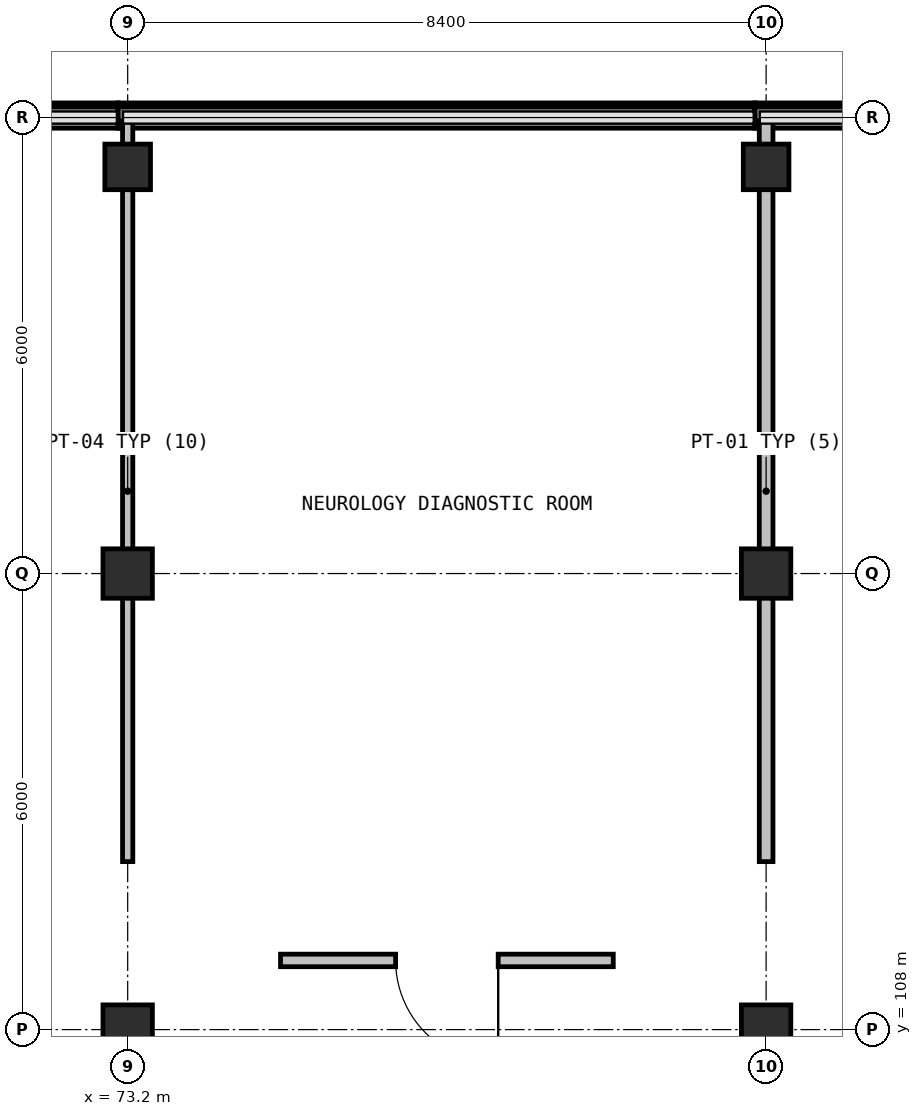
"""IFC4 building model, lengths in metres.
Left out: names, types, materials, properties, quantities, classifications, styles, units other than length and angle.
Written with IfcOpenShell. Run it as: python <this file> out.ifc"""

import sys

from ifc_helpers import new_model, si_unit, direction, frame, frame_2d, origin, origin_2d, place, context, subcontext, project, spatial, rectangle, extrude, element, fill, save


model = new_model("IFC4")
c1 = context("Model", 3, precision=1e-05, world=origin(), true_north=direction((0.0, 1.0)))
c2 = subcontext(c1, "Body", "Model", "MODEL_VIEW")
j1 = project(units=[si_unit("LENGTHUNIT", "METRE"), si_unit("PLANEANGLEUNIT", "RADIAN")], contexts=[c1])
p1 = place(None, origin())
s1 = spatial("IfcSite", under=j1, at=p1, CompositionType="ELEMENT")
p2 = place(p1, origin())
s2 = spatial("IfcBuilding", under=s1, at=p2, CompositionType="ELEMENT")
p3 = place(p2, frame((0.0, 0.0, 27.3)))
s3 = spatial("IfcBuildingStorey", under=s2, at=p3, CompositionType="ELEMENT", Elevation=27.3)
for number, where, z_axis, x_axis in (
    (1, (73.2, 108.0, 0.0), (0.0, 0.0, 1.0), (1.0, 0.0, 0.0)),
    (2, (73.2, 114.0, 0.0), (0.0, 0.0, 1.0), (1.0, 0.0, 0.0)),
):
    element("IfcColumn", number, at=place(p3, frame(where, z_axis=z_axis, x_axis=x_axis)), inside=s3, PredefinedType="COLUMN", context=c2, shape_type="SweptSolid", body=[
        extrude(rectangle(XDim=0.65, YDim=0.65, at=origin_2d()), origin(), (0.0, 0.0, 1.0), 4.05),
    ])
p4 = place(p3, frame((73.2, 119.35, 0.0), z_axis=(0.0, 0.0, 1.0), x_axis=(1.0, 0.0, 0.0)))
e3 = element("IfcColumn", 3, at=p4, inside=s3, PredefinedType="COLUMN", context=c2, shape_type="SweptSolid", body=[
    extrude(rectangle(XDim=0.6, YDim=0.6, at=origin_2d()), origin(), (0.0, 0.0, 1.0), 4.05),
])
for number, where, z_axis, x_axis in (
    (4, (81.6, 108.0, 0.0), (0.0, 0.0, 1.0), (1.0, 0.0, 0.0)),
    (5, (81.6, 114.0, 0.0), (0.0, 0.0, 1.0), (1.0, 0.0, 0.0)),
):
    element("IfcColumn", number, at=place(p3, frame(where, z_axis=z_axis, x_axis=x_axis)), inside=s3, PredefinedType="COLUMN", context=c2, shape_type="SweptSolid", body=[
        extrude(rectangle(XDim=0.65, YDim=0.65, at=origin_2d()), origin(), (0.0, 0.0, 1.0), 4.05),
    ])
p5 = place(p3, frame((81.6, 119.35, 0.0), z_axis=(0.0, 0.0, 1.0), x_axis=(1.0, 0.0, 0.0)))
e6 = element("IfcColumn", 6, at=p5, inside=s3, PredefinedType="COLUMN", context=c2, shape_type="SweptSolid", body=[
    extrude(rectangle(XDim=0.6, YDim=0.6, at=origin_2d()), origin(), (0.0, 0.0, 1.0), 4.05),
])
for number, where, z_axis, x_axis in (
    (7, (64.696, 119.999, 0.0), (0.0, 0.0, 1.0), (1.0, 0.0, 0.0)),
    (8, (73.075, 119.999, 0.0), (0.0, 0.0, 1.0), (1.0, 0.0, 0.0)),
    (9, (81.454, 119.999, 0.0), (0.0, 0.0, 1.0), (1.0, 0.0, 0.0)),
):
    element("IfcWall", number, at=place(p3, frame(where, z_axis=z_axis, x_axis=x_axis)), inside=s3, PredefinedType="SOLIDWALL", context=c2, shape_type="SweptSolid", body=[
        extrude(rectangle(XDim=8.375, YDim=0.28, at=frame_2d((4.188, 0.0))), origin(), (0.0, 0.0, 1.0), 0.94),
    ])
p6 = place(p3, frame((73.2, 119.957, 0.0), z_axis=(0.0, 0.0, 1.0), x_axis=(0.0, -1.0, 0.0)))
e10 = element("IfcWall", 10, at=p6, inside=s3, PredefinedType="PARTITIONING", context=c2, shape_type="SweptSolid", body=[
    extrude(rectangle(XDim=9.747, YDim=0.135, at=frame_2d((4.874, 0.0))), origin(), (0.0, 0.0, 1.0), 3.18),
])
p7 = place(p3, frame((81.6, 119.957, 0.0), z_axis=(0.0, 0.0, 1.0), x_axis=(0.0, -1.0, 0.0)))
e11 = element("IfcWall", 11, at=p7, inside=s3, PredefinedType="PARTITIONING", context=c2, shape_type="SweptSolid", body=[
    extrude(rectangle(XDim=9.747, YDim=0.18, at=frame_2d((4.874, 0.0))), origin(), (0.0, 0.0, 1.0), 3.18),
])
p8 = place(p3, frame((79.589, 108.91, 0.0), z_axis=(0.0, 0.0, 1.0), x_axis=(-1.0, 0.0, 0.0)))
e12 = element("IfcWall", 12, at=p8, inside=s3, PredefinedType="PARTITIONING", context=c2, shape_type="SweptSolid", body=[
    extrude(rectangle(XDim=4.378, YDim=0.165, at=frame_2d((2.189, 0.0))), origin(), (0.0, 0.0, 1.0), 3.78),
])
p9 = place(p8, frame((1.514, 0.0, 0.0)))
e13 = element("IfcOpeningElement", 13, at=p9, cuts=e12, PredefinedType="OPENING", context=c2, shape_type="SweptSolid", body=[
    extrude(rectangle(XDim=1.35, YDim=2.15, at=frame_2d((0.675, 1.075))), frame((0.0, 0.093, 0.0), z_axis=(0.0, -1.0, 0.0), x_axis=(1.0, 0.0, 0.0)), (0.0, 0.0, 1.0), 0.185),
])
p10 = place(p9, origin())
e14 = element("IfcDoor", 14, at=p10, inside=s3, OperationType="SINGLE_SWING_RIGHT", PredefinedType="DOOR", context=c2, shape_type="SweptSolid", body=[
    extrude(rectangle(XDim=1.35, YDim=2.15, at=frame_2d((0.675, 1.075))), frame((0.0, 0.025, 0.0), z_axis=(0.0, -1.0, 0.0), x_axis=(1.0, 0.0, 0.0)), (0.0, 0.0, 1.0), 0.05),
])
fill(e13, e14)
save(model, sys.argv[1])
